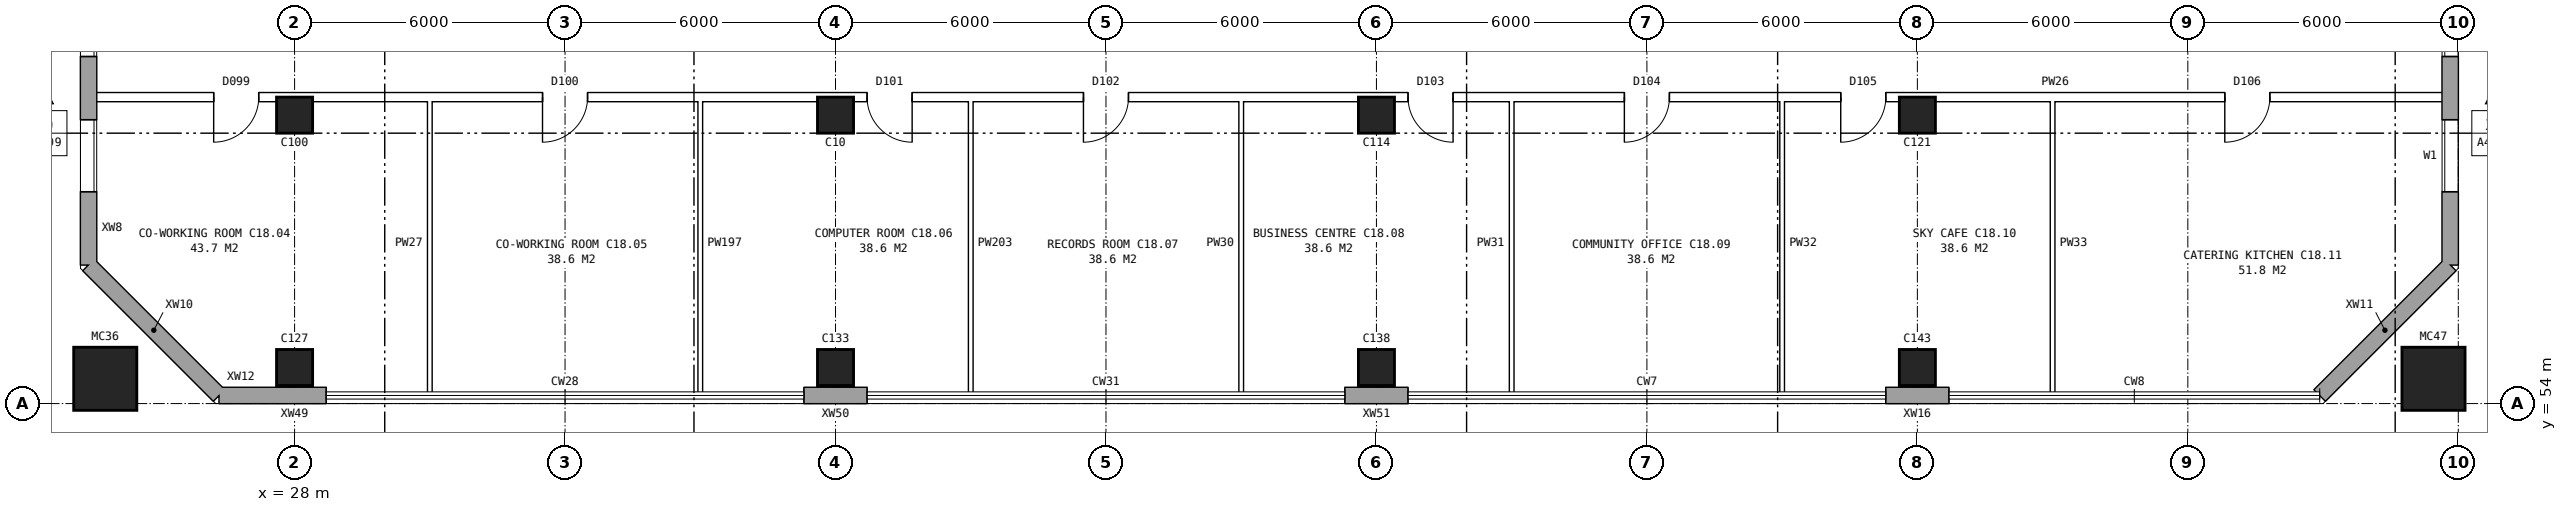
"""IFC4 building model, lengths in metres.
Left out: names, types, materials, properties, quantities, classifications, styles, units other than length and angle.
Written with IfcOpenShell. Run it as: python <this file> out.ifc"""

import sys

from ifc_helpers import new_model, si_unit, direction, frame, frame_2d, origin, origin_2d, place, context, subcontext, project, spatial, rectangle, hollow_rectangle, extrude, element, fill, save


model = new_model("IFC4")
c1 = context("Model", 3, precision=1e-05, world=origin(), true_north=direction((0.0, 1.0)))
c2 = subcontext(c1, "Body", "Model", "MODEL_VIEW")
j1 = project(units=[si_unit("LENGTHUNIT", "METRE"), si_unit("PLANEANGLEUNIT", "RADIAN")], contexts=[c1])
p1 = place(None, origin())
s1 = spatial("IfcSite", under=j1, at=p1, CompositionType="ELEMENT")
p2 = place(p1, origin())
s2 = spatial("IfcBuilding", under=s1, at=p2, CompositionType="ELEMENT")
p3 = place(p2, frame((0.0, 0.0, 67.4)))
s3 = spatial("IfcBuildingStorey", under=s2, at=p3, CompositionType="ELEMENT", Elevation=67.4)
for number, where, z_axis, x_axis in (
    (1, (28.0, 54.8, 0.0), (0.0, 0.0, 1.0), (1.0, 0.0, 0.0)),
    (2, (28.0, 60.4, 0.0), (0.0, 0.0, 1.0), (1.0, 0.0, 0.0)),
    (3, (40.0, 54.8, 0.0), (0.0, 0.0, 1.0), (1.0, 0.0, 0.0)),
    (4, (40.0, 60.4, 0.0), (0.0, 0.0, 1.0), (1.0, 0.0, 0.0)),
    (5, (52.0, 54.8, 0.0), (0.0, 0.0, 1.0), (1.0, 0.0, 0.0)),
    (6, (52.0, 60.4, 0.0), (0.0, 0.0, 1.0), (1.0, 0.0, 0.0)),
    (7, (64.0, 54.8, 0.0), (0.0, 0.0, 1.0), (1.0, 0.0, 0.0)),
    (8, (64.0, 60.4, 0.0), (0.0, 0.0, 1.0), (1.0, 0.0, 0.0)),
):
    element("IfcColumn", number, at=place(p3, frame(where, z_axis=z_axis, x_axis=x_axis)), inside=s3, PredefinedType="COLUMN", context=c2, shape_type="SweptSolid", body=[
        extrude(rectangle(XDim=0.8, YDim=0.8, at=origin_2d()), origin(), (0.0, 0.0, 1.0), 3.6),
    ])
for number, where, z_axis, x_axis in (
    (9, (23.8, 54.55, 0.0), (0.0, 0.0, 1.0), (1.0, 0.0, 0.0)),
    (10, (75.45, 54.55, 0.0), (0.0, 0.0, 1.0), (1.0, 0.0, 0.0)),
):
    element("IfcColumn", number, at=place(p3, frame(where, z_axis=z_axis, x_axis=x_axis)), inside=s3, PredefinedType="COLUMN", context=c2, shape_type="SweptSolid", body=[
        extrude(hollow_rectangle(XDim=1.4, YDim=1.4, WallThickness=0.075, at=origin_2d()), origin(), (0.0, 0.0, 1.0), 4.2),
    ])
p4 = place(p3, frame((23.43, 57.075, 0.0), z_axis=(0.0, 0.0, 1.0), x_axis=(0.707106781187, -0.707106781187, 0.0)))
e11 = element("IfcWall", 11, at=p4, inside=s3, PredefinedType="STANDARD", context=c2, shape_type="SweptSolid", body=[
    extrude(rectangle(XDim=4.094, YDim=0.36, at=frame_2d((2.047, 0.0))), origin(), (0.0, 0.0, 1.0), 3.6),
])
for number, where, z_axis, x_axis in (
    (12, (27.3, 54.18, 0.0), (0.0, 0.0, 1.0), (1.0, 0.0, 0.0)),
    (13, (39.3, 54.18, 0.0), (0.0, 0.0, 1.0), (1.0, 0.0, 0.0)),
    (14, (51.3, 54.18, 0.0), (0.0, 0.0, 1.0), (1.0, 0.0, 0.0)),
    (15, (63.3, 54.18, 0.0), (0.0, 0.0, 1.0), (1.0, 0.0, 0.0)),
):
    element("IfcWall", number, at=place(p3, frame(where, z_axis=z_axis, x_axis=x_axis)), inside=s3, PredefinedType="STANDARD", context=c2, shape_type="SweptSolid", body=[
        extrude(rectangle(XDim=1.4, YDim=0.36, at=frame_2d((0.7, 0.0))), origin(), (0.0, 0.0, 1.0), 3.6),
    ])
p5 = place(p3, frame((26.325, 54.18, 0.0), z_axis=(0.0, 0.0, 1.0), x_axis=(1.0, 0.0, 0.0)))
e16 = element("IfcWall", 16, at=p5, inside=s3, PredefinedType="STANDARD", context=c2, shape_type="SweptSolid", body=[
    extrude(rectangle(XDim=0.975, YDim=0.36, at=frame_2d((0.488, 0.0))), origin(), (0.0, 0.0, 1.0), 3.6),
])
p6 = place(p3, frame((72.925, 54.18, 0.0), z_axis=(0.0, 0.0, 1.0), x_axis=(0.707106781187, 0.707106781187, 0.0)))
e17 = element("IfcWall", 17, at=p6, inside=s3, PredefinedType="STANDARD", context=c2, shape_type="SweptSolid", body=[
    extrude(rectangle(XDim=4.094, YDim=0.36, at=frame_2d((2.047, 0.0))), origin(), (0.0, 0.0, 1.0), 3.6),
])
p7 = place(p3, frame((75.82, 57.075, 0.0), z_axis=(0.0, 0.0, 1.0), x_axis=(0.0, 1.0, 0.0)))
e18 = element("IfcWall", 18, at=p7, inside=s3, PredefinedType="STANDARD", context=c2, shape_type="SweptSolid", body=[
    extrude(rectangle(XDim=25.851, YDim=0.36, at=frame_2d((12.925, 0.0))), origin(), (0.0, 0.0, 1.0), 3.6),
])
p8 = place(p7, frame((1.625, 0.0, 0.8)))
e19 = element("IfcOpeningElement", 19, at=p8, cuts=e18, PredefinedType="OPENING", context=c2, shape_type="SweptSolid", body=[
    extrude(rectangle(XDim=1.6, YDim=1.8, at=frame_2d((0.8, 0.9))), frame((0.0, 0.19, 0.0), z_axis=(0.0, -1.0, 0.0), x_axis=(1.0, 0.0, 0.0)), (0.0, 0.0, 1.0), 0.38),
])
p9 = place(p7, frame((4.625, 0.0, 0.8)))
e20 = element("IfcOpeningElement", 20, at=p9, cuts=e18, PredefinedType="OPENING", context=c2, shape_type="SweptSolid", body=[
    extrude(rectangle(XDim=1.6, YDim=1.8, at=frame_2d((0.8, 0.9))), frame((0.0, 0.19, 0.0), z_axis=(0.0, -1.0, 0.0), x_axis=(1.0, 0.0, 0.0)), (0.0, 0.0, 1.0), 0.38),
])
p10 = place(p7, frame((19.625, 0.0, 0.8)))
e21 = element("IfcOpeningElement", 21, at=p10, cuts=e18, PredefinedType="OPENING", context=c2, shape_type="SweptSolid", body=[
    extrude(rectangle(XDim=1.6, YDim=1.8, at=frame_2d((0.8, 0.9))), frame((0.0, 0.19, 0.0), z_axis=(0.0, -1.0, 0.0), x_axis=(1.0, 0.0, 0.0)), (0.0, 0.0, 1.0), 0.38),
])
p11 = place(p7, frame((22.625, 0.0, 0.8)))
e22 = element("IfcOpeningElement", 22, at=p11, cuts=e18, PredefinedType="OPENING", context=c2, shape_type="SweptSolid", body=[
    extrude(rectangle(XDim=1.6, YDim=1.8, at=frame_2d((0.8, 0.9))), frame((0.0, 0.19, 0.0), z_axis=(0.0, -1.0, 0.0), x_axis=(1.0, 0.0, 0.0)), (0.0, 0.0, 1.0), 0.38),
])
p12 = place(p3, frame((23.43, 82.925, 0.0), z_axis=(0.0, 0.0, 1.0), x_axis=(0.0, -1.0, 0.0)))
e23 = element("IfcWall", 23, at=p12, inside=s3, PredefinedType="STANDARD", context=c2, shape_type="SweptSolid", body=[
    extrude(rectangle(XDim=25.851, YDim=0.36, at=frame_2d((12.925, 0.0))), origin(), (0.0, 0.0, 1.0), 3.6),
])
p13 = place(p12, frame((1.625, 0.0, 0.8)))
e24 = element("IfcOpeningElement", 24, at=p13, cuts=e23, PredefinedType="OPENING", context=c2, shape_type="SweptSolid", body=[
    extrude(rectangle(XDim=1.6, YDim=1.8, at=frame_2d((0.8, 0.9))), frame((0.0, 0.19, 0.0), z_axis=(0.0, -1.0, 0.0), x_axis=(1.0, 0.0, 0.0)), (0.0, 0.0, 1.0), 0.38),
])
p14 = place(p12, frame((4.625, 0.0, 0.8)))
e25 = element("IfcOpeningElement", 25, at=p14, cuts=e23, PredefinedType="OPENING", context=c2, shape_type="SweptSolid", body=[
    extrude(rectangle(XDim=1.6, YDim=1.8, at=frame_2d((0.8, 0.9))), frame((0.0, 0.19, 0.0), z_axis=(0.0, -1.0, 0.0), x_axis=(1.0, 0.0, 0.0)), (0.0, 0.0, 1.0), 0.38),
])
p15 = place(p12, frame((7.625, 0.0, 0.8)))
e26 = element("IfcOpeningElement", 26, at=p15, cuts=e23, PredefinedType="OPENING", context=c2, shape_type="SweptSolid", body=[
    extrude(rectangle(XDim=1.6, YDim=1.8, at=frame_2d((0.8, 0.9))), frame((0.0, 0.19, 0.0), z_axis=(0.0, -1.0, 0.0), x_axis=(1.0, 0.0, 0.0)), (0.0, 0.0, 1.0), 0.38),
])
p16 = place(p12, frame((10.625, 0.0, 0.8)))
e27 = element("IfcOpeningElement", 27, at=p16, cuts=e23, PredefinedType="OPENING", context=c2, shape_type="SweptSolid", body=[
    extrude(rectangle(XDim=1.6, YDim=1.8, at=frame_2d((0.8, 0.9))), frame((0.0, 0.19, 0.0), z_axis=(0.0, -1.0, 0.0), x_axis=(1.0, 0.0, 0.0)), (0.0, 0.0, 1.0), 0.38),
])
p17 = place(p12, frame((13.625, 0.0, 0.8)))
e28 = element("IfcOpeningElement", 28, at=p17, cuts=e23, PredefinedType="OPENING", context=c2, shape_type="SweptSolid", body=[
    extrude(rectangle(XDim=1.6, YDim=1.8, at=frame_2d((0.8, 0.9))), frame((0.0, 0.19, 0.0), z_axis=(0.0, -1.0, 0.0), x_axis=(1.0, 0.0, 0.0)), (0.0, 0.0, 1.0), 0.38),
])
p18 = place(p12, frame((16.625, 0.0, 0.8)))
e29 = element("IfcOpeningElement", 29, at=p18, cuts=e23, PredefinedType="OPENING", context=c2, shape_type="SweptSolid", body=[
    extrude(rectangle(XDim=1.6, YDim=1.8, at=frame_2d((0.8, 0.9))), frame((0.0, 0.19, 0.0), z_axis=(0.0, -1.0, 0.0), x_axis=(1.0, 0.0, 0.0)), (0.0, 0.0, 1.0), 0.38),
])
p19 = place(p12, frame((19.625, 0.0, 0.8)))
e30 = element("IfcOpeningElement", 30, at=p19, cuts=e23, PredefinedType="OPENING", context=c2, shape_type="SweptSolid", body=[
    extrude(rectangle(XDim=1.6, YDim=1.8, at=frame_2d((0.8, 0.9))), frame((0.0, 0.19, 0.0), z_axis=(0.0, -1.0, 0.0), x_axis=(1.0, 0.0, 0.0)), (0.0, 0.0, 1.0), 0.38),
])
p20 = place(p12, frame((22.625, 0.0, 0.8)))
e31 = element("IfcOpeningElement", 31, at=p20, cuts=e23, PredefinedType="OPENING", context=c2, shape_type="SweptSolid", body=[
    extrude(rectangle(XDim=1.6, YDim=1.8, at=frame_2d((0.8, 0.9))), frame((0.0, 0.19, 0.0), z_axis=(0.0, -1.0, 0.0), x_axis=(1.0, 0.0, 0.0)), (0.0, 0.0, 1.0), 0.38),
])
p21 = place(p3, frame((23.49, 60.8, 0.0), z_axis=(0.0, 0.0, 1.0), x_axis=(1.0, 0.0, 0.0)))
e32 = element("IfcWall", 32, at=p21, inside=s3, PredefinedType="PARTITIONING", context=c2, shape_type="SweptSolid", body=[
    extrude(rectangle(XDim=52.27, YDim=0.2, at=frame_2d((26.135, 0.0))), origin(), (0.0, 0.0, 1.0), 3.6),
])
p22 = place(p21, frame((2.715, 0.0, 0.0)))
e33 = element("IfcOpeningElement", 33, at=p22, cuts=e32, PredefinedType="OPENING", context=c2, shape_type="SweptSolid", body=[
    extrude(rectangle(XDim=1.0, YDim=2.1, at=frame_2d((0.5, 1.05))), frame((0.0, 0.11, 0.0), z_axis=(0.0, -1.0, 0.0), x_axis=(1.0, 0.0, 0.0)), (0.0, 0.0, 1.0), 0.22),
])
p23 = place(p21, frame((10.01, 0.0, 0.0)))
e34 = element("IfcOpeningElement", 34, at=p23, cuts=e32, PredefinedType="OPENING", context=c2, shape_type="SweptSolid", body=[
    extrude(rectangle(XDim=1.0, YDim=2.1, at=frame_2d((0.5, 1.05))), frame((0.0, 0.11, 0.0), z_axis=(0.0, -1.0, 0.0), x_axis=(1.0, 0.0, 0.0)), (0.0, 0.0, 1.0), 0.22),
])
p24 = place(p21, frame((17.21, 0.0, 0.0)))
e35 = element("IfcOpeningElement", 35, at=p24, cuts=e32, PredefinedType="OPENING", context=c2, shape_type="SweptSolid", body=[
    extrude(rectangle(XDim=1.0, YDim=2.1, at=frame_2d((0.5, 1.05))), frame((0.0, 0.11, 0.0), z_axis=(0.0, -1.0, 0.0), x_axis=(1.0, 0.0, 0.0)), (0.0, 0.0, 1.0), 0.22),
])
p25 = place(p21, frame((22.01, 0.0, 0.0)))
e36 = element("IfcOpeningElement", 36, at=p25, cuts=e32, PredefinedType="OPENING", context=c2, shape_type="SweptSolid", body=[
    extrude(rectangle(XDim=1.0, YDim=2.1, at=frame_2d((0.5, 1.05))), frame((0.0, 0.11, 0.0), z_axis=(0.0, -1.0, 0.0), x_axis=(1.0, 0.0, 0.0)), (0.0, 0.0, 1.0), 0.22),
])
p26 = place(p21, frame((29.21, 0.0, 0.0)))
e37 = element("IfcOpeningElement", 37, at=p26, cuts=e32, PredefinedType="OPENING", context=c2, shape_type="SweptSolid", body=[
    extrude(rectangle(XDim=1.0, YDim=2.1, at=frame_2d((0.5, 1.05))), frame((0.0, 0.11, 0.0), z_axis=(0.0, -1.0, 0.0), x_axis=(1.0, 0.0, 0.0)), (0.0, 0.0, 1.0), 0.22),
])
p27 = place(p21, frame((34.01, 0.0, 0.0)))
e38 = element("IfcOpeningElement", 38, at=p27, cuts=e32, PredefinedType="OPENING", context=c2, shape_type="SweptSolid", body=[
    extrude(rectangle(XDim=1.0, YDim=2.1, at=frame_2d((0.5, 1.05))), frame((0.0, 0.11, 0.0), z_axis=(0.0, -1.0, 0.0), x_axis=(1.0, 0.0, 0.0)), (0.0, 0.0, 1.0), 0.22),
])
p28 = place(p21, frame((38.81, 0.0, 0.0)))
e39 = element("IfcOpeningElement", 39, at=p28, cuts=e32, PredefinedType="OPENING", context=c2, shape_type="SweptSolid", body=[
    extrude(rectangle(XDim=1.0, YDim=2.1, at=frame_2d((0.5, 1.05))), frame((0.0, 0.11, 0.0), z_axis=(0.0, -1.0, 0.0), x_axis=(1.0, 0.0, 0.0)), (0.0, 0.0, 1.0), 0.22),
])
p29 = place(p21, frame((47.33, 0.0, 0.0)))
e40 = element("IfcOpeningElement", 40, at=p29, cuts=e32, PredefinedType="OPENING", context=c2, shape_type="SweptSolid", body=[
    extrude(rectangle(XDim=1.0, YDim=2.1, at=frame_2d((0.5, 1.05))), frame((0.0, 0.11, 0.0), z_axis=(0.0, -1.0, 0.0), x_axis=(1.0, 0.0, 0.0)), (0.0, 0.0, 1.0), 0.22),
])
for number, where, z_axis, x_axis in (
    (41, (31.0, 54.24, 0.0), (0.0, 0.0, 1.0), (0.0, 1.0, 0.0)),
    (42, (37.0, 54.24, 0.0), (0.0, 0.0, 1.0), (0.0, 1.0, 0.0)),
    (43, (43.0, 54.24, 0.0), (0.0, 0.0, 1.0), (0.0, 1.0, 0.0)),
    (44, (49.0, 54.24, 0.0), (0.0, 0.0, 1.0), (0.0, 1.0, 0.0)),
    (45, (55.0, 54.24, 0.0), (0.0, 0.0, 1.0), (0.0, 1.0, 0.0)),
    (46, (61.0, 54.24, 0.0), (0.0, 0.0, 1.0), (0.0, 1.0, 0.0)),
    (47, (67.0, 54.24, 0.0), (0.0, 0.0, 1.0), (0.0, 1.0, 0.0)),
):
    element("IfcWall", number, at=place(p3, frame(where, z_axis=z_axis, x_axis=x_axis)), inside=s3, PredefinedType="PARTITIONING", context=c2, shape_type="SweptSolid", body=[
        extrude(rectangle(XDim=6.66, YDim=0.1, at=frame_2d((3.33, 0.0))), origin(), (0.0, 0.0, 1.0), 3.6),
    ])
p30 = place(p8, origin())
e48 = element("IfcWindow", 48, at=p30, inside=s3, PartitioningType="SINGLE_PANEL", PredefinedType="WINDOW", context=c2, shape_type="SweptSolid", body=[
    extrude(rectangle(XDim=1.6, YDim=1.8, at=frame_2d((0.8, 0.9))), frame((0.0, 0.15, 0.0), z_axis=(0.0, -1.0, 0.0), x_axis=(1.0, 0.0, 0.0)), (0.0, 0.0, 1.0), 0.06),
])
fill(e19, e48)
p31 = place(p9, origin())
e49 = element("IfcWindow", 49, at=p31, inside=s3, PartitioningType="SINGLE_PANEL", PredefinedType="WINDOW", context=c2, shape_type="SweptSolid", body=[
    extrude(rectangle(XDim=1.6, YDim=1.8, at=frame_2d((0.8, 0.9))), frame((0.0, 0.15, 0.0), z_axis=(0.0, -1.0, 0.0), x_axis=(1.0, 0.0, 0.0)), (0.0, 0.0, 1.0), 0.06),
])
fill(e20, e49)
p32 = place(p19, origin())
e50 = element("IfcWindow", 50, at=p32, inside=s3, PartitioningType="SINGLE_PANEL", PredefinedType="WINDOW", context=c2, shape_type="SweptSolid", body=[
    extrude(rectangle(XDim=1.6, YDim=1.8, at=frame_2d((0.8, 0.9))), frame((0.0, 0.15, 0.0), z_axis=(0.0, -1.0, 0.0), x_axis=(1.0, 0.0, 0.0)), (0.0, 0.0, 1.0), 0.06),
])
fill(e30, e50)
p33 = place(p20, origin())
e51 = element("IfcWindow", 51, at=p33, inside=s3, PartitioningType="SINGLE_PANEL", PredefinedType="WINDOW", context=c2, shape_type="SweptSolid", body=[
    extrude(rectangle(XDim=1.6, YDim=1.8, at=frame_2d((0.8, 0.9))), frame((0.0, 0.15, 0.0), z_axis=(0.0, -1.0, 0.0), x_axis=(1.0, 0.0, 0.0)), (0.0, 0.0, 1.0), 0.06),
])
fill(e31, e51)
p34 = place(p22, frame((1.0, 0.0, 0.0), z_axis=(0.0, 0.0, 1.0), x_axis=(-1.0, 0.0, 0.0)))
e52 = element("IfcDoor", 52, at=p34, inside=s3, OperationType="SINGLE_SWING_RIGHT", PredefinedType="DOOR", context=c2, shape_type="SweptSolid", body=[
    extrude(rectangle(XDim=1.0, YDim=2.1, at=frame_2d((0.5, 1.05))), frame((0.0, 0.025, 0.0), z_axis=(0.0, -1.0, 0.0), x_axis=(1.0, 0.0, 0.0)), (0.0, 0.0, 1.0), 0.05),
])
fill(e33, e52)
p35 = place(p23, frame((1.0, 0.0, 0.0), z_axis=(0.0, 0.0, 1.0), x_axis=(-1.0, 0.0, 0.0)))
e53 = element("IfcDoor", 53, at=p35, inside=s3, OperationType="SINGLE_SWING_RIGHT", PredefinedType="DOOR", context=c2, shape_type="SweptSolid", body=[
    extrude(rectangle(XDim=1.0, YDim=2.1, at=frame_2d((0.5, 1.05))), frame((0.0, 0.025, 0.0), z_axis=(0.0, -1.0, 0.0), x_axis=(1.0, 0.0, 0.0)), (0.0, 0.0, 1.0), 0.05),
])
fill(e34, e53)
p36 = place(p24, frame((1.0, 0.0, 0.0), z_axis=(0.0, 0.0, 1.0), x_axis=(-1.0, 0.0, 0.0)))
e54 = element("IfcDoor", 54, at=p36, inside=s3, OperationType="SINGLE_SWING_LEFT", PredefinedType="DOOR", context=c2, shape_type="SweptSolid", body=[
    extrude(rectangle(XDim=1.0, YDim=2.1, at=frame_2d((0.5, 1.05))), frame((0.0, 0.025, 0.0), z_axis=(0.0, -1.0, 0.0), x_axis=(1.0, 0.0, 0.0)), (0.0, 0.0, 1.0), 0.05),
])
fill(e35, e54)
p37 = place(p25, frame((1.0, 0.0, 0.0), z_axis=(0.0, 0.0, 1.0), x_axis=(-1.0, 0.0, 0.0)))
e55 = element("IfcDoor", 55, at=p37, inside=s3, OperationType="SINGLE_SWING_RIGHT", PredefinedType="DOOR", context=c2, shape_type="SweptSolid", body=[
    extrude(rectangle(XDim=1.0, YDim=2.1, at=frame_2d((0.5, 1.05))), frame((0.0, 0.025, 0.0), z_axis=(0.0, -1.0, 0.0), x_axis=(1.0, 0.0, 0.0)), (0.0, 0.0, 1.0), 0.05),
])
fill(e36, e55)
p38 = place(p26, frame((1.0, 0.0, 0.0), z_axis=(0.0, 0.0, 1.0), x_axis=(-1.0, 0.0, 0.0)))
e56 = element("IfcDoor", 56, at=p38, inside=s3, OperationType="SINGLE_SWING_LEFT", PredefinedType="DOOR", context=c2, shape_type="SweptSolid", body=[
    extrude(rectangle(XDim=1.0, YDim=2.1, at=frame_2d((0.5, 1.05))), frame((0.0, 0.025, 0.0), z_axis=(0.0, -1.0, 0.0), x_axis=(1.0, 0.0, 0.0)), (0.0, 0.0, 1.0), 0.05),
])
fill(e37, e56)
p39 = place(p27, frame((1.0, 0.0, 0.0), z_axis=(0.0, 0.0, 1.0), x_axis=(-1.0, 0.0, 0.0)))
e57 = element("IfcDoor", 57, at=p39, inside=s3, OperationType="SINGLE_SWING_RIGHT", PredefinedType="DOOR", context=c2, shape_type="SweptSolid", body=[
    extrude(rectangle(XDim=1.0, YDim=2.1, at=frame_2d((0.5, 1.05))), frame((0.0, 0.025, 0.0), z_axis=(0.0, -1.0, 0.0), x_axis=(1.0, 0.0, 0.0)), (0.0, 0.0, 1.0), 0.05),
])
fill(e38, e57)
p40 = place(p28, frame((1.0, 0.0, 0.0), z_axis=(0.0, 0.0, 1.0), x_axis=(-1.0, 0.0, 0.0)))
e58 = element("IfcDoor", 58, at=p40, inside=s3, OperationType="SINGLE_SWING_RIGHT", PredefinedType="DOOR", context=c2, shape_type="SweptSolid", body=[
    extrude(rectangle(XDim=1.0, YDim=2.1, at=frame_2d((0.5, 1.05))), frame((0.0, 0.025, 0.0), z_axis=(0.0, -1.0, 0.0), x_axis=(1.0, 0.0, 0.0)), (0.0, 0.0, 1.0), 0.05),
])
fill(e39, e58)
p41 = place(p29, frame((1.0, 0.0, 0.0), z_axis=(0.0, 0.0, 1.0), x_axis=(-1.0, 0.0, 0.0)))
e59 = element("IfcDoor", 59, at=p41, inside=s3, OperationType="SINGLE_SWING_RIGHT", PredefinedType="DOOR", context=c2, shape_type="SweptSolid", body=[
    extrude(rectangle(XDim=1.0, YDim=2.1, at=frame_2d((0.5, 1.05))), frame((0.0, 0.025, 0.0), z_axis=(0.0, -1.0, 0.0), x_axis=(1.0, 0.0, 0.0)), (0.0, 0.0, 1.0), 0.05),
])
fill(e40, e59)
save(model, sys.argv[1])
